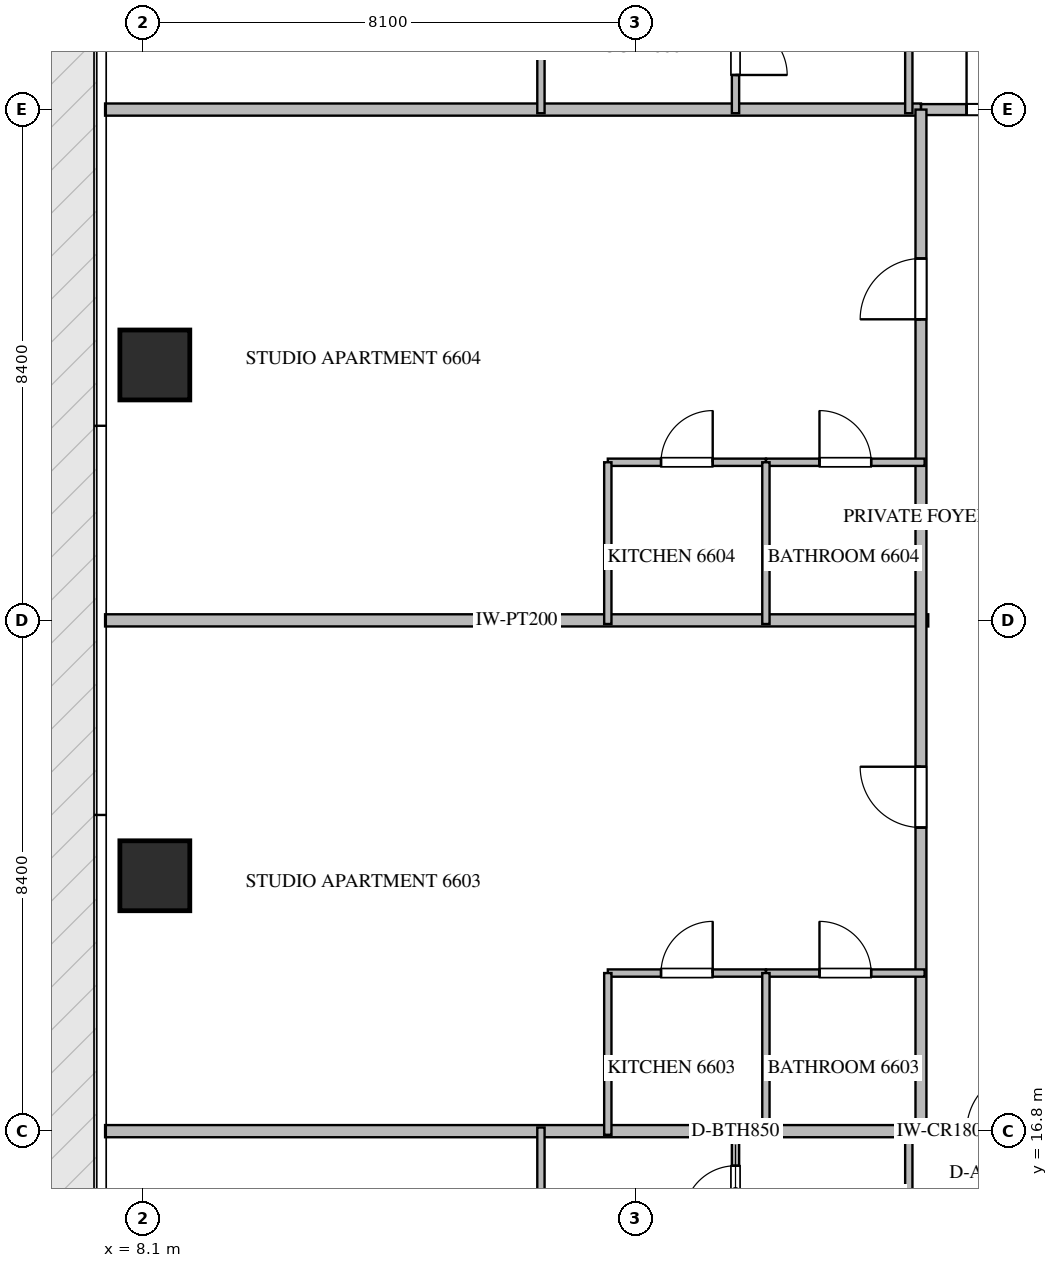
"""IFC4 building model, lengths in metres.
Left out: names, types, materials, properties, quantities, classifications, styles, units other than length and angle.
Written with IfcOpenShell. Run it as: python <this file> out.ifc"""

import sys

from ifc_helpers import new_model, si_unit, direction, frame, frame_2d, origin, origin_2d, place, context, subcontext, project, spatial, rectangle, extrude, source, transform, mapped, element, fill, save


model = new_model("IFC4")
c1 = context("Model", 3, precision=1e-05, world=origin(), true_north=direction((0.0, 1.0)))
c2 = subcontext(c1, "Body", "Model", "MODEL_VIEW")
j1 = project(units=[si_unit("LENGTHUNIT", "METRE"), si_unit("PLANEANGLEUNIT", "RADIAN")], contexts=[c1])
p1 = place(None, origin())
s1 = spatial("IfcSite", under=j1, at=p1, CompositionType="ELEMENT")
p2 = place(p1, origin())
s2 = spatial("IfcBuilding", under=s1, at=p2, CompositionType="ELEMENT")
p3 = place(p2, frame((0.0, 0.0, 264.35)))
s3 = spatial("IfcBuildingStorey", under=s2, at=p3, CompositionType="ELEMENT", Elevation=264.35)
m1 = source(origin(), c2, "Body", "SweptSolid", [
    extrude(rectangle(XDim=1.15, YDim=1.15, at=origin_2d()), origin(), (0.0, 0.0, 1.0), 3.85),
])
for number, where, z_axis, x_axis in (
    (1, (8.3, 21.0, -0.26), (0.0, 0.0, 1.0), (1.0, 0.0, 0.0)),
    (2, (8.3, 29.4, -0.26), (0.0, 0.0, 1.0), (1.0, 0.0, 0.0)),
):
    element("IfcColumn", number, at=place(p3, frame(where, z_axis=z_axis, x_axis=x_axis)), inside=s3, PredefinedType="COLUMN", context=c2, shape_type="MappedRepresentation", body=[
        mapped(m1, transform((0.0, 0.0, 0.0), scale=1.0)),
    ])
p4 = place(p3, frame((7.482, 25.2, 0.0), z_axis=(0.0, 0.0, 1.0), x_axis=(1.0, 0.0, 0.0)))
e3 = element("IfcWall", 3, at=p4, inside=s3, PredefinedType="PARTITIONING", context=c2, shape_type="SweptSolid", body=[
    extrude(rectangle(XDim=13.538, YDim=0.2, at=frame_2d((6.769, 0.0))), origin(), (0.0, 0.0, 1.0), 3.59),
])
for number, where, z_axis, x_axis in (
    (4, (7.482, 16.8, 0.0), (0.0, 0.0, 1.0), (1.0, 0.0, 0.0)),
    (5, (7.482, 33.6, 0.0), (0.0, 0.0, 1.0), (1.0, 0.0, 0.0)),
):
    element("IfcWall", number, at=place(p3, frame(where, z_axis=z_axis, x_axis=x_axis)), inside=s3, PredefinedType="PARTITIONING", context=c2, shape_type="SweptSolid", body=[
        extrude(rectangle(XDim=13.418, YDim=0.2, at=frame_2d((6.709, 0.0))), origin(), (0.0, 0.0, 1.0), 3.59),
    ])
p5 = place(p3, frame((20.902, 16.8, 0.0), z_axis=(0.0, 0.0, 1.0), x_axis=(1.0, 0.0, 0.0)))
e6 = element("IfcWall", 6, at=p5, inside=s3, PredefinedType="PARTITIONING", context=c2, shape_type="SweptSolid", body=[
    extrude(rectangle(XDim=2.496, YDim=0.18, at=frame_2d((1.248, 0.0))), origin(), (0.0, 0.0, 1.0), 3.59),
])
p6 = place(p5, frame((0.748, 0.0, 0.0)))
e7 = element("IfcOpeningElement", 7, at=p6, cuts=e6, PredefinedType="OPENING", context=c2, shape_type="SweptSolid", body=[
    extrude(rectangle(XDim=1.0, YDim=2.15, at=frame_2d((0.5, 1.075))), frame((0.0, 0.1, 0.0), z_axis=(0.0, -1.0, 0.0), x_axis=(1.0, 0.0, 0.0)), (0.0, 0.0, 1.0), 0.2),
])
p7 = place(p3, frame((20.902, 33.6, 0.0), z_axis=(0.0, 0.0, 1.0), x_axis=(1.0, 0.0, 0.0)))
e8 = element("IfcWall", 8, at=p7, inside=s3, PredefinedType="PARTITIONING", context=c2, shape_type="SweptSolid", body=[
    extrude(rectangle(XDim=2.496, YDim=0.18, at=frame_2d((1.248, 0.0))), origin(), (0.0, 0.0, 1.0), 3.59),
])
p8 = place(p7, frame((0.748, 0.0, 0.0)))
e9 = element("IfcOpeningElement", 9, at=p8, cuts=e8, PredefinedType="OPENING", context=c2, shape_type="SweptSolid", body=[
    extrude(rectangle(XDim=1.0, YDim=2.15, at=frame_2d((0.5, 1.075))), frame((0.0, 0.1, 0.0), z_axis=(0.0, -1.0, 0.0), x_axis=(1.0, 0.0, 0.0)), (0.0, 0.0, 1.0), 0.2),
])
p9 = place(p3, frame((20.9, 16.8, 0.0), z_axis=(0.0, 0.0, 1.0), x_axis=(0.0, 1.0, 0.0)))
e10 = element("IfcWall", 10, at=p9, inside=s3, PredefinedType="PARTITIONING", context=c2, shape_type="SweptSolid", body=[
    extrude(rectangle(XDim=16.8, YDim=0.18, at=frame_2d((8.4, 0.0))), origin(), (0.0, 0.0, 1.0), 3.59),
])
p10 = place(p9, frame((4.993, 0.0, 0.0)))
e11 = element("IfcOpeningElement", 11, at=p10, cuts=e10, PredefinedType="OPENING", context=c2, shape_type="SweptSolid", body=[
    extrude(rectangle(XDim=1.0, YDim=2.15, at=frame_2d((0.5, 1.075))), frame((0.0, 0.1, 0.0), z_axis=(0.0, -1.0, 0.0), x_axis=(1.0, 0.0, 0.0)), (0.0, 0.0, 1.0), 0.2),
])
p11 = place(p9, frame((13.351, 0.0, 0.0)))
e12 = element("IfcOpeningElement", 12, at=p11, cuts=e10, PredefinedType="OPENING", context=c2, shape_type="SweptSolid", body=[
    extrude(rectangle(XDim=1.0, YDim=2.15, at=frame_2d((0.5, 1.075))), frame((0.0, 0.1, 0.0), z_axis=(0.0, -1.0, 0.0), x_axis=(1.0, 0.0, 0.0)), (0.0, 0.0, 1.0), 0.2),
])
p12 = place(p3, frame((20.7, 14.05, 0.0), z_axis=(0.0, 0.0, 1.0), x_axis=(0.0, 1.0, 0.0)))
e13 = element("IfcWall", 13, at=p12, inside=s3, PredefinedType="PARTITIONING", context=c2, shape_type="SweptSolid", body=[
    extrude(rectangle(XDim=2.81, YDim=0.12, at=frame_2d((1.405, 0.0))), origin(), (0.0, 0.0, 1.0), 3.59),
])
p13 = place(p3, frame((14.65, 14.75, 0.0), z_axis=(0.0, 0.0, 1.0), x_axis=(0.0, 1.0, 0.0)))
e14 = element("IfcWall", 14, at=p13, inside=s3, PredefinedType="PARTITIONING", context=c2, shape_type="SweptSolid", body=[
    extrude(rectangle(XDim=2.11, YDim=0.12, at=frame_2d((1.055, 0.0))), origin(), (0.0, 0.0, 1.0), 3.59),
])
p14 = place(p3, frame((17.85, 14.752, 0.0), z_axis=(0.0, 0.0, 1.0), x_axis=(0.0, 1.0, 0.0)))
e15 = element("IfcWall", 15, at=p14, inside=s3, PredefinedType="PARTITIONING", context=c2, shape_type="SweptSolid", body=[
    extrude(rectangle(XDim=2.108, YDim=0.12, at=frame_2d((1.054, 0.0))), origin(), (0.0, 0.0, 1.0), 3.59),
])
p15 = place(p14, frame((0.629, 0.0, 0.0)))
e16 = element("IfcOpeningElement", 16, at=p15, cuts=e15, PredefinedType="OPENING", context=c2, shape_type="SweptSolid", body=[
    extrude(rectangle(XDim=0.85, YDim=2.1, at=frame_2d((0.425, 1.05))), frame((0.0, 0.07, 0.0), z_axis=(0.0, -1.0, 0.0), x_axis=(1.0, 0.0, 0.0)), (0.0, 0.0, 1.0), 0.14),
])
p16 = place(p3, frame((20.7, 36.35, 0.0), z_axis=(0.0, 0.0, 1.0), x_axis=(0.0, -1.0, 0.0)))
e17 = element("IfcWall", 17, at=p16, inside=s3, PredefinedType="PARTITIONING", context=c2, shape_type="SweptSolid", body=[
    extrude(rectangle(XDim=2.81, YDim=0.12, at=frame_2d((1.405, 0.0))), origin(), (0.0, 0.0, 1.0), 3.59),
])
p17 = place(p3, frame((14.65, 35.65, 0.0), z_axis=(0.0, 0.0, 1.0), x_axis=(0.0, -1.0, 0.0)))
e18 = element("IfcWall", 18, at=p17, inside=s3, PredefinedType="PARTITIONING", context=c2, shape_type="SweptSolid", body=[
    extrude(rectangle(XDim=2.11, YDim=0.12, at=frame_2d((1.055, 0.0))), origin(), (0.0, 0.0, 1.0), 3.59),
])
p18 = place(p3, frame((17.85, 35.648, 0.0), z_axis=(0.0, 0.0, 1.0), x_axis=(0.0, -1.0, 0.0)))
e19 = element("IfcWall", 19, at=p18, inside=s3, PredefinedType="PARTITIONING", context=c2, shape_type="SweptSolid", body=[
    extrude(rectangle(XDim=2.108, YDim=0.12, at=frame_2d((1.054, 0.0))), origin(), (0.0, 0.0, 1.0), 3.59),
])
p19 = place(p18, frame((0.629, 0.0, 0.0)))
e20 = element("IfcOpeningElement", 20, at=p19, cuts=e19, PredefinedType="OPENING", context=c2, shape_type="SweptSolid", body=[
    extrude(rectangle(XDim=0.85, YDim=2.1, at=frame_2d((0.425, 1.05))), frame((0.0, 0.07, 0.0), z_axis=(0.0, -1.0, 0.0), x_axis=(1.0, 0.0, 0.0)), (0.0, 0.0, 1.0), 0.14),
])
p20 = place(p3, frame((15.75, 19.4, 0.0), z_axis=(0.0, 0.0, 1.0), x_axis=(1.0, 0.0, 0.0)))
e21 = element("IfcWall", 21, at=p20, inside=s3, PredefinedType="PARTITIONING", context=c2, shape_type="SweptSolid", body=[
    extrude(rectangle(XDim=2.6, YDim=0.12, at=frame_2d((1.3, 0.0))), origin(), (0.0, 0.0, 1.0), 3.59),
])
p21 = place(p20, frame((0.875, 0.0, 0.0)))
e22 = element("IfcOpeningElement", 22, at=p21, cuts=e21, PredefinedType="OPENING", context=c2, shape_type="SweptSolid", body=[
    extrude(rectangle(XDim=0.85, YDim=2.1, at=frame_2d((0.425, 1.05))), frame((0.0, 0.07, 0.0), z_axis=(0.0, -1.0, 0.0), x_axis=(1.0, 0.0, 0.0)), (0.0, 0.0, 1.0), 0.14),
])
p22 = place(p3, frame((18.352, 19.4, 0.0), z_axis=(0.0, 0.0, 1.0), x_axis=(1.0, 0.0, 0.0)))
e23 = element("IfcWall", 23, at=p22, inside=s3, PredefinedType="PARTITIONING", context=c2, shape_type="SweptSolid", body=[
    extrude(rectangle(XDim=2.608, YDim=0.12, at=frame_2d((1.304, 0.0))), origin(), (0.0, 0.0, 1.0), 3.59),
])
p23 = place(p22, frame((0.879, 0.0, 0.0)))
e24 = element("IfcOpeningElement", 24, at=p23, cuts=e23, PredefinedType="OPENING", context=c2, shape_type="SweptSolid", body=[
    extrude(rectangle(XDim=0.85, YDim=2.1, at=frame_2d((0.425, 1.05))), frame((0.0, 0.07, 0.0), z_axis=(0.0, -1.0, 0.0), x_axis=(1.0, 0.0, 0.0)), (0.0, 0.0, 1.0), 0.14),
])
for number, where, z_axis, x_axis in (
    (25, (18.35, 16.74, 0.0), (0.0, 0.0, 1.0), (0.0, 1.0, 0.0)),
    (26, (15.75, 16.74, 0.0), (0.0, 0.0, 1.0), (0.0, 1.0, 0.0)),
):
    element("IfcWall", number, at=place(p3, frame(where, z_axis=z_axis, x_axis=x_axis)), inside=s3, PredefinedType="PARTITIONING", context=c2, shape_type="SweptSolid", body=[
        extrude(rectangle(XDim=2.66, YDim=0.12, at=frame_2d((1.33, 0.0))), origin(), (0.0, 0.0, 1.0), 3.59),
    ])
p24 = place(p3, frame((15.75, 27.8, 0.0), z_axis=(0.0, 0.0, 1.0), x_axis=(1.0, 0.0, 0.0)))
e27 = element("IfcWall", 27, at=p24, inside=s3, PredefinedType="PARTITIONING", context=c2, shape_type="SweptSolid", body=[
    extrude(rectangle(XDim=2.6, YDim=0.12, at=frame_2d((1.3, 0.0))), origin(), (0.0, 0.0, 1.0), 3.59),
])
p25 = place(p24, frame((0.875, 0.0, 0.0)))
e28 = element("IfcOpeningElement", 28, at=p25, cuts=e27, PredefinedType="OPENING", context=c2, shape_type="SweptSolid", body=[
    extrude(rectangle(XDim=0.85, YDim=2.1, at=frame_2d((0.425, 1.05))), frame((0.0, 0.07, 0.0), z_axis=(0.0, -1.0, 0.0), x_axis=(1.0, 0.0, 0.0)), (0.0, 0.0, 1.0), 0.14),
])
p26 = place(p3, frame((18.352, 27.8, 0.0), z_axis=(0.0, 0.0, 1.0), x_axis=(1.0, 0.0, 0.0)))
e29 = element("IfcWall", 29, at=p26, inside=s3, PredefinedType="PARTITIONING", context=c2, shape_type="SweptSolid", body=[
    extrude(rectangle(XDim=2.608, YDim=0.12, at=frame_2d((1.304, 0.0))), origin(), (0.0, 0.0, 1.0), 3.59),
])
p27 = place(p26, frame((0.879, 0.0, 0.0)))
e30 = element("IfcOpeningElement", 30, at=p27, cuts=e29, PredefinedType="OPENING", context=c2, shape_type="SweptSolid", body=[
    extrude(rectangle(XDim=0.85, YDim=2.1, at=frame_2d((0.425, 1.05))), frame((0.0, 0.07, 0.0), z_axis=(0.0, -1.0, 0.0), x_axis=(1.0, 0.0, 0.0)), (0.0, 0.0, 1.0), 0.14),
])
for number, where, z_axis, x_axis in (
    (31, (18.35, 25.14, 0.0), (0.0, 0.0, 1.0), (0.0, 1.0, 0.0)),
    (32, (15.75, 25.14, 0.0), (0.0, 0.0, 1.0), (0.0, 1.0, 0.0)),
):
    element("IfcWall", number, at=place(p3, frame(where, z_axis=z_axis, x_axis=x_axis)), inside=s3, PredefinedType="PARTITIONING", context=c2, shape_type="SweptSolid", body=[
        extrude(rectangle(XDim=2.66, YDim=0.12, at=frame_2d((1.33, 0.0))), origin(), (0.0, 0.0, 1.0), 3.59),
    ])
m2 = source(origin(), c2, "Body", "SweptSolid", [
    extrude(rectangle(XDim=1.0, YDim=2.15, at=frame_2d((0.5, 1.075))), frame((0.0, 0.025, 0.0), z_axis=(0.0, -1.0, 0.0), x_axis=(1.0, 0.0, 0.0)), (0.0, 0.0, 1.0), 0.05),
])
p28 = place(p6, origin())
e33 = element("IfcDoor", 33, at=p28, inside=s3, OperationType="SINGLE_SWING_RIGHT", PredefinedType="DOOR", context=c2, shape_type="MappedRepresentation", body=[
    mapped(m2, transform((0.0, 0.0, 0.0), scale=1.0)),
])
fill(e7, e33)
p29 = place(p8, origin())
e34 = element("IfcDoor", 34, at=p29, inside=s3, OperationType="SINGLE_SWING_LEFT", PredefinedType="DOOR", context=c2, shape_type="MappedRepresentation", body=[
    mapped(m2, transform((0.0, 0.0, 0.0), scale=1.0)),
])
fill(e9, e34)
p30 = place(p10, origin())
e35 = element("IfcDoor", 35, at=p30, inside=s3, OperationType="SINGLE_SWING_RIGHT", PredefinedType="DOOR", context=c2, shape_type="MappedRepresentation", body=[
    mapped(m2, transform((0.0, 0.0, 0.0), scale=1.0)),
])
fill(e11, e35)
p31 = place(p11, origin())
e36 = element("IfcDoor", 36, at=p31, inside=s3, OperationType="SINGLE_SWING_LEFT", PredefinedType="DOOR", context=c2, shape_type="MappedRepresentation", body=[
    mapped(m2, transform((0.0, 0.0, 0.0), scale=1.0)),
])
fill(e12, e36)
m3 = source(origin(), c2, "Body", "SweptSolid", [
    extrude(rectangle(XDim=0.85, YDim=2.1, at=frame_2d((0.425, 1.05))), frame((0.0, 0.025, 0.0), z_axis=(0.0, -1.0, 0.0), x_axis=(1.0, 0.0, 0.0)), (0.0, 0.0, 1.0), 0.05),
])
p32 = place(p15, origin())
e37 = element("IfcDoor", 37, at=p32, inside=s3, OperationType="SINGLE_SWING_LEFT", PredefinedType="DOOR", context=c2, shape_type="MappedRepresentation", body=[
    mapped(m3, transform((0.0, 0.0, 0.0), scale=1.0)),
])
fill(e16, e37)
p33 = place(p19, origin())
e38 = element("IfcDoor", 38, at=p33, inside=s3, OperationType="SINGLE_SWING_RIGHT", PredefinedType="DOOR", context=c2, shape_type="MappedRepresentation", body=[
    mapped(m3, transform((0.0, 0.0, 0.0), scale=1.0)),
])
fill(e20, e38)
p34 = place(p21, origin())
e39 = element("IfcDoor", 39, at=p34, inside=s3, OperationType="SINGLE_SWING_RIGHT", PredefinedType="DOOR", context=c2, shape_type="MappedRepresentation", body=[
    mapped(m3, transform((0.0, 0.0, 0.0), scale=1.0)),
])
fill(e22, e39)
p35 = place(p23, origin())
e40 = element("IfcDoor", 40, at=p35, inside=s3, OperationType="SINGLE_SWING_LEFT", PredefinedType="DOOR", context=c2, shape_type="MappedRepresentation", body=[
    mapped(m3, transform((0.0, 0.0, 0.0), scale=1.0)),
])
fill(e24, e40)
p36 = place(p25, origin())
e41 = element("IfcDoor", 41, at=p36, inside=s3, OperationType="SINGLE_SWING_RIGHT", PredefinedType="DOOR", context=c2, shape_type="MappedRepresentation", body=[
    mapped(m3, transform((0.0, 0.0, 0.0), scale=1.0)),
])
fill(e28, e41)
p37 = place(p27, origin())
e42 = element("IfcDoor", 42, at=p37, inside=s3, OperationType="SINGLE_SWING_LEFT", PredefinedType="DOOR", context=c2, shape_type="MappedRepresentation", body=[
    mapped(m3, transform((0.0, 0.0, 0.0), scale=1.0)),
])
fill(e30, e42)
save(model, sys.argv[1])
